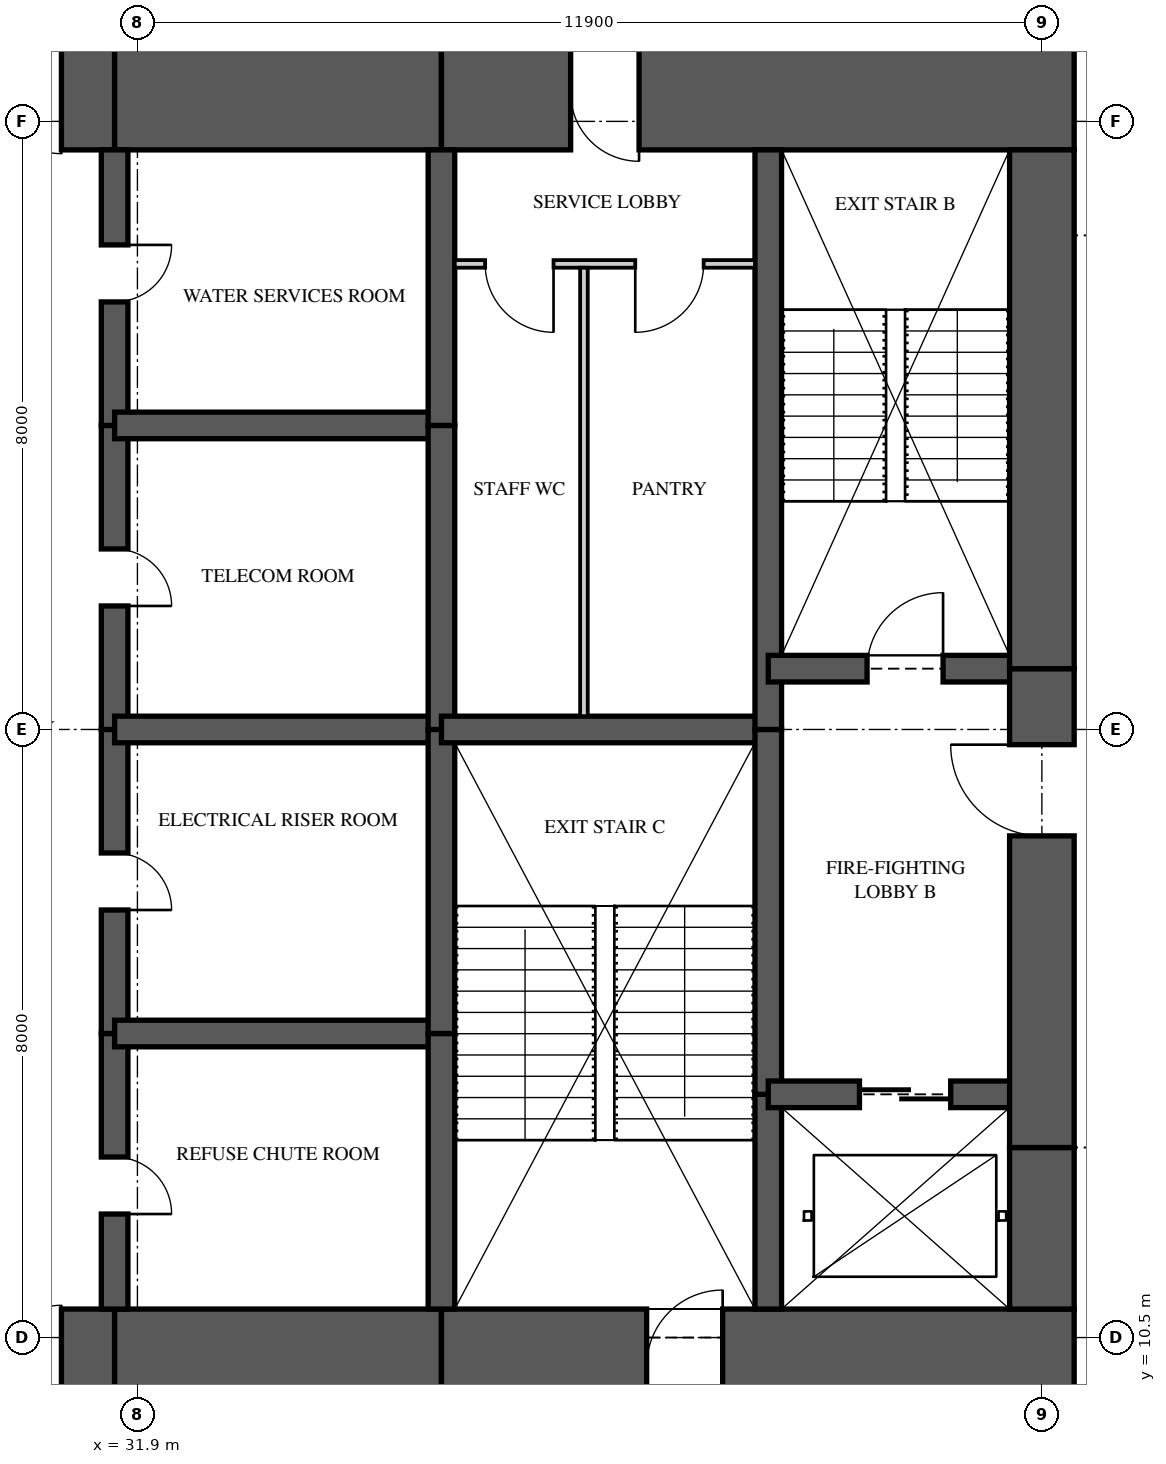
"""IFC4 building model, lengths in metres.
Left out: names, types, materials, properties, quantities, classifications, styles, units other than length and angle.
Written with IfcOpenShell. Run it as: python <this file> out.ifc"""

import sys

from ifc_helpers import new_model, si_unit, direction, frame, frame_2d, origin, place, context, subcontext, project, spatial, rectangle, extrude, element, fill, save


model = new_model("IFC4")
c1 = context("Model", 3, precision=1e-05, world=origin(), true_north=direction((0.0, 1.0)))
c2 = subcontext(c1, "Body", "Model", "MODEL_VIEW")
j1 = project(units=[si_unit("LENGTHUNIT", "METRE"), si_unit("PLANEANGLEUNIT", "RADIAN")], contexts=[c1])
p1 = place(None, origin())
s1 = spatial("IfcSite", under=j1, at=p1, CompositionType="ELEMENT")
p2 = place(p1, origin())
s2 = spatial("IfcBuilding", under=s1, at=p2, CompositionType="ELEMENT")
p3 = place(p2, frame((0.0, 0.0, 104.85)))
s3 = spatial("IfcBuildingStorey", under=s2, at=p3, CompositionType="ELEMENT", Elevation=104.85)
p4 = place(p3, frame((26.0, 10.125, 0.0), z_axis=(0.0, 0.0, 1.0), x_axis=(1.0, 0.0, 0.0)))
e1 = element("IfcWall", 1, at=p4, inside=s3, PredefinedType="SHEAR", context=c2, shape_type="SweptSolid", body=[
    extrude(rectangle(XDim=5.6, YDim=1.5, at=frame_2d((2.8, 0.0))), origin(), (0.0, 0.0, 1.0), 3.35),
])
p5 = place(p4, frame((3.3, 0.0, 0.0)))
e2 = element("IfcOpeningElement", 2, at=p5, cuts=e1, PredefinedType="OPENING", context=c2, shape_type="SweptSolid", body=[
    extrude(rectangle(XDim=1.6, YDim=2.1, at=frame_2d((0.8, 1.05))), frame((0.0, 0.76, 0.0), z_axis=(0.0, -1.0, 0.0), x_axis=(1.0, 0.0, 0.0)), (0.0, 0.0, 1.0), 1.52),
])
p6 = place(p3, frame((31.6, 10.125, 0.0), z_axis=(0.0, 0.0, 1.0), x_axis=(1.0, 0.0, 0.0)))
e3 = element("IfcWall", 3, at=p6, inside=s3, PredefinedType="SHEAR", context=c2, shape_type="SweptSolid", body=[
    extrude(rectangle(XDim=4.3, YDim=1.5, at=frame_2d((2.15, 0.0))), origin(), (0.0, 0.0, 1.0), 3.35),
])
p7 = place(p3, frame((35.9, 10.125, 0.0), z_axis=(0.0, 0.0, 1.0), x_axis=(1.0, 0.0, 0.0)))
e4 = element("IfcWall", 4, at=p7, inside=s3, PredefinedType="SHEAR", context=c2, shape_type="SweptSolid", body=[
    extrude(rectangle(XDim=8.325, YDim=1.5, at=frame_2d((4.163, 0.0))), origin(), (0.0, 0.0, 1.0), 3.35),
])
p8 = place(p7, frame((2.7, 0.0, 0.0)))
e5 = element("IfcOpeningElement", 5, at=p8, cuts=e4, PredefinedType="OPENING", context=c2, shape_type="SweptSolid", body=[
    extrude(rectangle(XDim=1.0, YDim=2.1, at=frame_2d((0.5, 1.05))), frame((0.0, 0.76, 0.0), z_axis=(0.0, -1.0, 0.0), x_axis=(1.0, 0.0, 0.0)), (0.0, 0.0, 1.0), 1.52),
])
p9 = place(p3, frame((44.225, 26.875, 0.0), z_axis=(0.0, 0.0, 1.0), x_axis=(-1.0, 0.0, 0.0)))
e6 = element("IfcWall", 6, at=p9, inside=s3, PredefinedType="SHEAR", context=c2, shape_type="SweptSolid", body=[
    extrude(rectangle(XDim=8.325, YDim=1.5, at=frame_2d((4.163, 0.0))), origin(), (0.0, 0.0, 1.0), 3.35),
])
p10 = place(p9, frame((5.725, 0.0, 0.0)))
e7 = element("IfcOpeningElement", 7, at=p10, cuts=e6, PredefinedType="OPENING", context=c2, shape_type="SweptSolid", body=[
    extrude(rectangle(XDim=0.9, YDim=2.1, at=frame_2d((0.45, 1.05))), frame((0.0, 0.76, 0.0), z_axis=(0.0, -1.0, 0.0), x_axis=(1.0, 0.0, 0.0)), (0.0, 0.0, 1.0), 1.52),
])
p11 = place(p3, frame((35.9, 26.875, 0.0), z_axis=(0.0, 0.0, 1.0), x_axis=(-1.0, 0.0, 0.0)))
e8 = element("IfcWall", 8, at=p11, inside=s3, PredefinedType="SHEAR", context=c2, shape_type="SweptSolid", body=[
    extrude(rectangle(XDim=4.3, YDim=1.5, at=frame_2d((2.15, 0.0))), origin(), (0.0, 0.0, 1.0), 3.35),
])
p12 = place(p3, frame((31.6, 26.875, 0.0), z_axis=(0.0, 0.0, 1.0), x_axis=(-1.0, 0.0, 0.0)))
e9 = element("IfcWall", 9, at=p12, inside=s3, PredefinedType="SHEAR", context=c2, shape_type="SweptSolid", body=[
    extrude(rectangle(XDim=5.6, YDim=1.5, at=frame_2d((2.8, 0.0))), origin(), (0.0, 0.0, 1.0), 3.35),
])
p13 = place(p12, frame((0.7, 0.0, 0.0)))
e10 = element("IfcOpeningElement", 10, at=p13, cuts=e9, PredefinedType="OPENING", context=c2, shape_type="SweptSolid", body=[
    extrude(rectangle(XDim=1.6, YDim=2.1, at=frame_2d((0.8, 1.05))), frame((0.0, 0.76, 0.0), z_axis=(0.0, -1.0, 0.0), x_axis=(1.0, 0.0, 0.0)), (0.0, 0.0, 1.0), 1.52),
])
p14 = place(p3, frame((43.8, 10.875, 0.0), z_axis=(0.0, 0.0, 1.0), x_axis=(0.0, 1.0, 0.0)))
e11 = element("IfcWall", 11, at=p14, inside=s3, PredefinedType="SHEAR", context=c2, shape_type="SweptSolid", body=[
    extrude(rectangle(XDim=2.125, YDim=0.85, at=frame_2d((1.062, 0.0))), origin(), (0.0, 0.0, 1.0), 3.35),
])
p15 = place(p3, frame((43.8, 13.0, 0.0), z_axis=(0.0, 0.0, 1.0), x_axis=(0.0, 1.0, 0.0)))
e12 = element("IfcWall", 12, at=p15, inside=s3, PredefinedType="SHEAR", context=c2, shape_type="SweptSolid", body=[
    extrude(rectangle(XDim=6.3, YDim=0.85, at=frame_2d((3.15, 0.0))), origin(), (0.0, 0.0, 1.0), 3.35),
])
p16 = place(p15, frame((4.1, 0.0, 0.0)))
e13 = element("IfcOpeningElement", 13, at=p16, cuts=e12, PredefinedType="OPENING", context=c2, shape_type="SweptSolid", body=[
    extrude(rectangle(XDim=1.2, YDim=2.2, at=frame_2d((0.6, 1.1))), frame((0.0, 0.435, 0.0), z_axis=(0.0, -1.0, 0.0), x_axis=(1.0, 0.0, 0.0)), (0.0, 0.0, 1.0), 0.87),
])
p17 = place(p3, frame((43.8, 19.3, 0.0), z_axis=(0.0, 0.0, 1.0), x_axis=(0.0, 1.0, 0.0)))
e14 = element("IfcWall", 14, at=p17, inside=s3, PredefinedType="SHEAR", context=c2, shape_type="SweptSolid", body=[
    extrude(rectangle(XDim=6.825, YDim=0.85, at=frame_2d((3.413, 0.0))), origin(), (0.0, 0.0, 1.0), 3.35),
])
p18 = place(p3, frame((31.6, 10.875, 0.0), z_axis=(0.0, 0.0, 1.0), x_axis=(0.0, 1.0, 0.0)))
e15 = element("IfcWall", 15, at=p18, inside=s3, PredefinedType="SHEAR", context=c2, shape_type="SweptSolid", body=[
    extrude(rectangle(XDim=3.625, YDim=0.35, at=frame_2d((1.812, 0.0))), origin(), (0.0, 0.0, 1.0), 3.35),
])
p19 = place(p18, frame((1.25, 0.0, 0.0)))
e16 = element("IfcOpeningElement", 16, at=p19, cuts=e15, PredefinedType="OPENING", context=c2, shape_type="SweptSolid", body=[
    extrude(rectangle(XDim=0.75, YDim=2.1, at=frame_2d((0.375, 1.05))), frame((0.0, 0.185, 0.0), z_axis=(0.0, -1.0, 0.0), x_axis=(1.0, 0.0, 0.0)), (0.0, 0.0, 1.0), 0.37),
])
p20 = place(p3, frame((31.6, 14.5, 0.0), z_axis=(0.0, 0.0, 1.0), x_axis=(0.0, 1.0, 0.0)))
e17 = element("IfcWall", 17, at=p20, inside=s3, PredefinedType="SHEAR", context=c2, shape_type="SweptSolid", body=[
    extrude(rectangle(XDim=4.0, YDim=0.35, at=frame_2d((2.0, 0.0))), origin(), (0.0, 0.0, 1.0), 3.35),
])
p21 = place(p20, frame((1.625, 0.0, 0.0)))
e18 = element("IfcOpeningElement", 18, at=p21, cuts=e17, PredefinedType="OPENING", context=c2, shape_type="SweptSolid", body=[
    extrude(rectangle(XDim=0.75, YDim=2.1, at=frame_2d((0.375, 1.05))), frame((0.0, 0.185, 0.0), z_axis=(0.0, -1.0, 0.0), x_axis=(1.0, 0.0, 0.0)), (0.0, 0.0, 1.0), 0.37),
])
p22 = place(p3, frame((31.6, 18.5, 0.0), z_axis=(0.0, 0.0, 1.0), x_axis=(0.0, 1.0, 0.0)))
e19 = element("IfcWall", 19, at=p22, inside=s3, PredefinedType="SHEAR", context=c2, shape_type="SweptSolid", body=[
    extrude(rectangle(XDim=4.0, YDim=0.35, at=frame_2d((2.0, 0.0))), origin(), (0.0, 0.0, 1.0), 3.35),
])
p23 = place(p22, frame((1.625, 0.0, 0.0)))
e20 = element("IfcOpeningElement", 20, at=p23, cuts=e19, PredefinedType="OPENING", context=c2, shape_type="SweptSolid", body=[
    extrude(rectangle(XDim=0.75, YDim=2.1, at=frame_2d((0.375, 1.05))), frame((0.0, 0.185, 0.0), z_axis=(0.0, -1.0, 0.0), x_axis=(1.0, 0.0, 0.0)), (0.0, 0.0, 1.0), 0.37),
])
p24 = place(p3, frame((31.6, 22.5, 0.0), z_axis=(0.0, 0.0, 1.0), x_axis=(0.0, 1.0, 0.0)))
e21 = element("IfcWall", 21, at=p24, inside=s3, PredefinedType="SHEAR", context=c2, shape_type="SweptSolid", body=[
    extrude(rectangle(XDim=3.625, YDim=0.35, at=frame_2d((1.812, 0.0))), origin(), (0.0, 0.0, 1.0), 3.35),
])
p25 = place(p24, frame((1.625, 0.0, 0.0)))
e22 = element("IfcOpeningElement", 22, at=p25, cuts=e21, PredefinedType="OPENING", context=c2, shape_type="SweptSolid", body=[
    extrude(rectangle(XDim=0.75, YDim=2.1, at=frame_2d((0.375, 1.05))), frame((0.0, 0.185, 0.0), z_axis=(0.0, -1.0, 0.0), x_axis=(1.0, 0.0, 0.0)), (0.0, 0.0, 1.0), 0.37),
])
p26 = place(p3, frame((35.9, 10.875, 0.0), z_axis=(0.0, 0.0, 1.0), x_axis=(0.0, 1.0, 0.0)))
e23 = element("IfcWall", 23, at=p26, inside=s3, PredefinedType="SHEAR", context=c2, shape_type="SweptSolid", body=[
    extrude(rectangle(XDim=3.625, YDim=0.35, at=frame_2d((1.812, 0.0))), origin(), (0.0, 0.0, 1.0), 3.35),
])
for number, where, z_axis, x_axis in (
    (24, (35.9, 14.5, 0.0), (0.0, 0.0, 1.0), (0.0, 1.0, 0.0)),
    (25, (35.9, 18.5, 0.0), (0.0, 0.0, 1.0), (0.0, 1.0, 0.0)),
):
    element("IfcWall", number, at=place(p3, frame(where, z_axis=z_axis, x_axis=x_axis)), inside=s3, PredefinedType="SHEAR", context=c2, shape_type="SweptSolid", body=[
        extrude(rectangle(XDim=4.0, YDim=0.35, at=frame_2d((2.0, 0.0))), origin(), (0.0, 0.0, 1.0), 3.35),
    ])
p27 = place(p3, frame((35.9, 22.5, 0.0), z_axis=(0.0, 0.0, 1.0), x_axis=(0.0, 1.0, 0.0)))
e26 = element("IfcWall", 26, at=p27, inside=s3, PredefinedType="SHEAR", context=c2, shape_type="SweptSolid", body=[
    extrude(rectangle(XDim=3.625, YDim=0.35, at=frame_2d((1.812, 0.0))), origin(), (0.0, 0.0, 1.0), 3.35),
])
p28 = place(p3, frame((40.2, 10.875, 0.0), z_axis=(0.0, 0.0, 1.0), x_axis=(0.0, 1.0, 0.0)))
e27 = element("IfcWall", 27, at=p28, inside=s3, PredefinedType="SHEAR", context=c2, shape_type="SweptSolid", body=[
    extrude(rectangle(XDim=2.825, YDim=0.35, at=frame_2d((1.413, 0.0))), origin(), (0.0, 0.0, 1.0), 3.35),
])
p29 = place(p3, frame((40.2, 13.7, 0.0), z_axis=(0.0, 0.0, 1.0), x_axis=(0.0, 1.0, 0.0)))
e28 = element("IfcWall", 28, at=p29, inside=s3, PredefinedType="SHEAR", context=c2, shape_type="SweptSolid", body=[
    extrude(rectangle(XDim=4.8, YDim=0.35, at=frame_2d((2.4, 0.0))), origin(), (0.0, 0.0, 1.0), 3.35),
])
p30 = place(p3, frame((40.2, 18.5, 0.0), z_axis=(0.0, 0.0, 1.0), x_axis=(0.0, 1.0, 0.0)))
e29 = element("IfcWall", 29, at=p30, inside=s3, PredefinedType="SHEAR", context=c2, shape_type="SweptSolid", body=[
    extrude(rectangle(XDim=7.625, YDim=0.35, at=frame_2d((3.812, 0.0))), origin(), (0.0, 0.0, 1.0), 3.35),
])
for number, where, z_axis, x_axis in (
    (30, (31.6, 14.5, 0.0), (0.0, 0.0, 1.0), (1.0, 0.0, 0.0)),
    (31, (31.6, 18.5, 0.0), (0.0, 0.0, 1.0), (1.0, 0.0, 0.0)),
    (32, (31.6, 22.5, 0.0), (0.0, 0.0, 1.0), (1.0, 0.0, 0.0)),
):
    element("IfcWall", number, at=place(p3, frame(where, z_axis=z_axis, x_axis=x_axis)), inside=s3, PredefinedType="SHEAR", context=c2, shape_type="SweptSolid", body=[
        extrude(rectangle(XDim=4.3, YDim=0.35, at=frame_2d((2.15, 0.0))), origin(), (0.0, 0.0, 1.0), 3.35),
    ])
p31 = place(p3, frame((35.9, 18.5, 0.0), z_axis=(0.0, 0.0, 1.0), x_axis=(1.0, 0.0, 0.0)))
e33 = element("IfcWall", 33, at=p31, inside=s3, PredefinedType="SHEAR", context=c2, shape_type="SweptSolid", body=[
    extrude(rectangle(XDim=4.3, YDim=0.35, at=frame_2d((2.15, 0.0))), origin(), (0.0, 0.0, 1.0), 3.35),
])
p32 = place(p3, frame((40.2, 13.7, 0.0), z_axis=(0.0, 0.0, 1.0), x_axis=(1.0, 0.0, 0.0)))
e34 = element("IfcWall", 34, at=p32, inside=s3, PredefinedType="SHEAR", context=c2, shape_type="SweptSolid", body=[
    extrude(rectangle(XDim=3.6, YDim=0.35, at=frame_2d((1.8, 0.0))), origin(), (0.0, 0.0, 1.0), 3.35),
])
p33 = place(p32, frame((1.2, 0.0, 0.0)))
e35 = element("IfcOpeningElement", 35, at=p33, cuts=e34, PredefinedType="OPENING", context=c2, shape_type="SweptSolid", body=[
    extrude(rectangle(XDim=1.2, YDim=2.1, at=frame_2d((0.6, 1.05))), frame((0.0, 0.185, 0.0), z_axis=(0.0, -1.0, 0.0), x_axis=(1.0, 0.0, 0.0)), (0.0, 0.0, 1.0), 0.37),
])
p34 = place(p3, frame((40.2, 19.3, 0.0), z_axis=(0.0, 0.0, 1.0), x_axis=(1.0, 0.0, 0.0)))
e36 = element("IfcWall", 36, at=p34, inside=s3, PredefinedType="SHEAR", context=c2, shape_type="SweptSolid", body=[
    extrude(rectangle(XDim=3.6, YDim=0.35, at=frame_2d((1.8, 0.0))), origin(), (0.0, 0.0, 1.0), 3.35),
])
p35 = place(p34, frame((1.3, 0.0, 0.0)))
e37 = element("IfcOpeningElement", 37, at=p35, cuts=e36, PredefinedType="OPENING", context=c2, shape_type="SweptSolid", body=[
    extrude(rectangle(XDim=1.0, YDim=2.1, at=frame_2d((0.5, 1.05))), frame((0.0, 0.185, 0.0), z_axis=(0.0, -1.0, 0.0), x_axis=(1.0, 0.0, 0.0)), (0.0, 0.0, 1.0), 0.37),
])
p36 = place(p3, frame((36.075, 24.625, 0.0), z_axis=(0.0, 0.0, 1.0), x_axis=(1.0, 0.0, 0.0)))
e38 = element("IfcWall", 38, at=p36, inside=s3, PredefinedType="PARTITIONING", context=c2, shape_type="SweptSolid", body=[
    extrude(rectangle(XDim=3.95, YDim=0.1, at=frame_2d((1.975, 0.0))), origin(), (0.0, 0.0, 1.0), 3.11),
])
p37 = place(p36, frame((0.4, 0.0, 0.0)))
e39 = element("IfcOpeningElement", 39, at=p37, cuts=e38, PredefinedType="OPENING", context=c2, shape_type="SweptSolid", body=[
    extrude(rectangle(XDim=0.9, YDim=2.1, at=frame_2d((0.45, 1.05))), frame((0.0, 0.06, 0.0), z_axis=(0.0, -1.0, 0.0), x_axis=(1.0, 0.0, 0.0)), (0.0, 0.0, 1.0), 0.12),
])
p38 = place(p36, frame((2.375, 0.0, 0.0)))
e40 = element("IfcOpeningElement", 40, at=p38, cuts=e38, PredefinedType="OPENING", context=c2, shape_type="SweptSolid", body=[
    extrude(rectangle(XDim=0.9, YDim=2.1, at=frame_2d((0.45, 1.05))), frame((0.0, 0.06, 0.0), z_axis=(0.0, -1.0, 0.0), x_axis=(1.0, 0.0, 0.0)), (0.0, 0.0, 1.0), 0.12),
])
p39 = place(p3, frame((37.775, 18.675, 0.0), z_axis=(0.0, 0.0, 1.0), x_axis=(0.0, 1.0, 0.0)))
e41 = element("IfcWall", 41, at=p39, inside=s3, PredefinedType="PARTITIONING", context=c2, shape_type="SweptSolid", body=[
    extrude(rectangle(XDim=5.9, YDim=0.1, at=frame_2d((2.95, 0.0))), origin(), (0.0, 0.0, 1.0), 3.11),
])
p40 = place(p37, frame((0.9, 0.0, 0.0), z_axis=(0.0, 0.0, 1.0), x_axis=(-1.0, 0.0, 0.0)))
e42 = element("IfcDoor", 42, at=p40, inside=s3, OperationType="SINGLE_SWING_LEFT", PredefinedType="DOOR", context=c2, shape_type="SweptSolid", body=[
    extrude(rectangle(XDim=0.9, YDim=2.1, at=frame_2d((0.45, 1.05))), frame((0.0, 0.025, 0.0), z_axis=(0.0, -1.0, 0.0), x_axis=(1.0, 0.0, 0.0)), (0.0, 0.0, 1.0), 0.05),
])
fill(e39, e42)
p41 = place(p38, frame((0.9, 0.0, 0.0), z_axis=(0.0, 0.0, 1.0), x_axis=(-1.0, 0.0, 0.0)))
e43 = element("IfcDoor", 43, at=p41, inside=s3, OperationType="SINGLE_SWING_RIGHT", PredefinedType="DOOR", context=c2, shape_type="SweptSolid", body=[
    extrude(rectangle(XDim=0.9, YDim=2.1, at=frame_2d((0.45, 1.05))), frame((0.0, 0.025, 0.0), z_axis=(0.0, -1.0, 0.0), x_axis=(1.0, 0.0, 0.0)), (0.0, 0.0, 1.0), 0.05),
])
fill(e40, e43)
p42 = place(p35, origin())
e44 = element("IfcDoor", 44, at=p42, inside=s3, OperationType="SINGLE_SWING_RIGHT", PredefinedType="DOOR", context=c2, shape_type="SweptSolid", body=[
    extrude(rectangle(XDim=1.0, YDim=2.1, at=frame_2d((0.5, 1.05))), frame((0.0, 0.025, 0.0), z_axis=(0.0, -1.0, 0.0), x_axis=(1.0, 0.0, 0.0)), (0.0, 0.0, 1.0), 0.05),
])
fill(e37, e44)
p43 = place(p16, origin())
e45 = element("IfcDoor", 45, at=p43, inside=s3, OperationType="SINGLE_SWING_RIGHT", PredefinedType="DOOR", context=c2, shape_type="SweptSolid", body=[
    extrude(rectangle(XDim=1.2, YDim=2.2, at=frame_2d((0.6, 1.1))), frame((0.0, 0.025, 0.0), z_axis=(0.0, -1.0, 0.0), x_axis=(1.0, 0.0, 0.0)), (0.0, 0.0, 1.0), 0.05),
])
fill(e13, e45)
p44 = place(p33, origin())
e46 = element("IfcDoor", 46, at=p44, inside=s3, OperationType="SLIDING_TO_LEFT", PredefinedType="DOOR", context=c2, shape_type="SweptSolid", body=[
    extrude(rectangle(XDim=1.2, YDim=2.1, at=frame_2d((0.6, 1.05))), frame((0.0, 0.025, 0.0), z_axis=(0.0, -1.0, 0.0), x_axis=(1.0, 0.0, 0.0)), (0.0, 0.0, 1.0), 0.05),
])
fill(e35, e46)
p45 = place(p5, origin())
e47 = element("IfcDoor", 47, at=p45, inside=s3, OperationType="DOUBLE_DOOR_SINGLE_SWING", PredefinedType="DOOR", context=c2, shape_type="SweptSolid", body=[
    extrude(rectangle(XDim=1.6, YDim=2.1, at=frame_2d((0.8, 1.05))), frame((0.0, 0.025, 0.0), z_axis=(0.0, -1.0, 0.0), x_axis=(1.0, 0.0, 0.0)), (0.0, 0.0, 1.0), 0.05),
])
fill(e2, e47)
p46 = place(p13, origin())
e48 = element("IfcDoor", 48, at=p46, inside=s3, OperationType="DOUBLE_DOOR_SINGLE_SWING", PredefinedType="DOOR", context=c2, shape_type="SweptSolid", body=[
    extrude(rectangle(XDim=1.6, YDim=2.1, at=frame_2d((0.8, 1.05))), frame((0.0, 0.025, 0.0), z_axis=(0.0, -1.0, 0.0), x_axis=(1.0, 0.0, 0.0)), (0.0, 0.0, 1.0), 0.05),
])
fill(e10, e48)
p47 = place(p19, frame((0.75, 0.0, 0.0), z_axis=(0.0, 0.0, 1.0), x_axis=(-1.0, 0.0, 0.0)))
e49 = element("IfcDoor", 49, at=p47, inside=s3, OperationType="SINGLE_SWING_RIGHT", PredefinedType="DOOR", context=c2, shape_type="SweptSolid", body=[
    extrude(rectangle(XDim=0.75, YDim=2.1, at=frame_2d((0.375, 1.05))), frame((0.0, 0.025, 0.0), z_axis=(0.0, -1.0, 0.0), x_axis=(1.0, 0.0, 0.0)), (0.0, 0.0, 1.0), 0.05),
])
fill(e16, e49)
p48 = place(p21, frame((0.75, 0.0, 0.0), z_axis=(0.0, 0.0, 1.0), x_axis=(-1.0, 0.0, 0.0)))
e50 = element("IfcDoor", 50, at=p48, inside=s3, OperationType="SINGLE_SWING_RIGHT", PredefinedType="DOOR", context=c2, shape_type="SweptSolid", body=[
    extrude(rectangle(XDim=0.75, YDim=2.1, at=frame_2d((0.375, 1.05))), frame((0.0, 0.025, 0.0), z_axis=(0.0, -1.0, 0.0), x_axis=(1.0, 0.0, 0.0)), (0.0, 0.0, 1.0), 0.05),
])
fill(e18, e50)
p49 = place(p23, frame((0.75, 0.0, 0.0), z_axis=(0.0, 0.0, 1.0), x_axis=(-1.0, 0.0, 0.0)))
e51 = element("IfcDoor", 51, at=p49, inside=s3, OperationType="SINGLE_SWING_RIGHT", PredefinedType="DOOR", context=c2, shape_type="SweptSolid", body=[
    extrude(rectangle(XDim=0.75, YDim=2.1, at=frame_2d((0.375, 1.05))), frame((0.0, 0.025, 0.0), z_axis=(0.0, -1.0, 0.0), x_axis=(1.0, 0.0, 0.0)), (0.0, 0.0, 1.0), 0.05),
])
fill(e20, e51)
p50 = place(p25, frame((0.75, 0.0, 0.0), z_axis=(0.0, 0.0, 1.0), x_axis=(-1.0, 0.0, 0.0)))
e52 = element("IfcDoor", 52, at=p50, inside=s3, OperationType="SINGLE_SWING_LEFT", PredefinedType="DOOR", context=c2, shape_type="SweptSolid", body=[
    extrude(rectangle(XDim=0.75, YDim=2.1, at=frame_2d((0.375, 1.05))), frame((0.0, 0.025, 0.0), z_axis=(0.0, -1.0, 0.0), x_axis=(1.0, 0.0, 0.0)), (0.0, 0.0, 1.0), 0.05),
])
fill(e22, e52)
p51 = place(p8, origin())
e53 = element("IfcDoor", 53, at=p51, inside=s3, OperationType="SINGLE_SWING_RIGHT", PredefinedType="DOOR", context=c2, shape_type="SweptSolid", body=[
    extrude(rectangle(XDim=1.0, YDim=2.1, at=frame_2d((0.5, 1.05))), frame((0.0, 0.025, 0.0), z_axis=(0.0, -1.0, 0.0), x_axis=(1.0, 0.0, 0.0)), (0.0, 0.0, 1.0), 0.05),
])
fill(e5, e53)
p52 = place(p10, origin())
e54 = element("IfcDoor", 54, at=p52, inside=s3, OperationType="SINGLE_SWING_LEFT", PredefinedType="DOOR", context=c2, shape_type="SweptSolid", body=[
    extrude(rectangle(XDim=0.9, YDim=2.1, at=frame_2d((0.45, 1.05))), frame((0.0, 0.47, 0.0), z_axis=(0.0, -1.0, 0.0), x_axis=(1.0, 0.0, 0.0)), (0.0, 0.0, 1.0), 0.8),
])
fill(e7, e54)
save(model, sys.argv[1])
